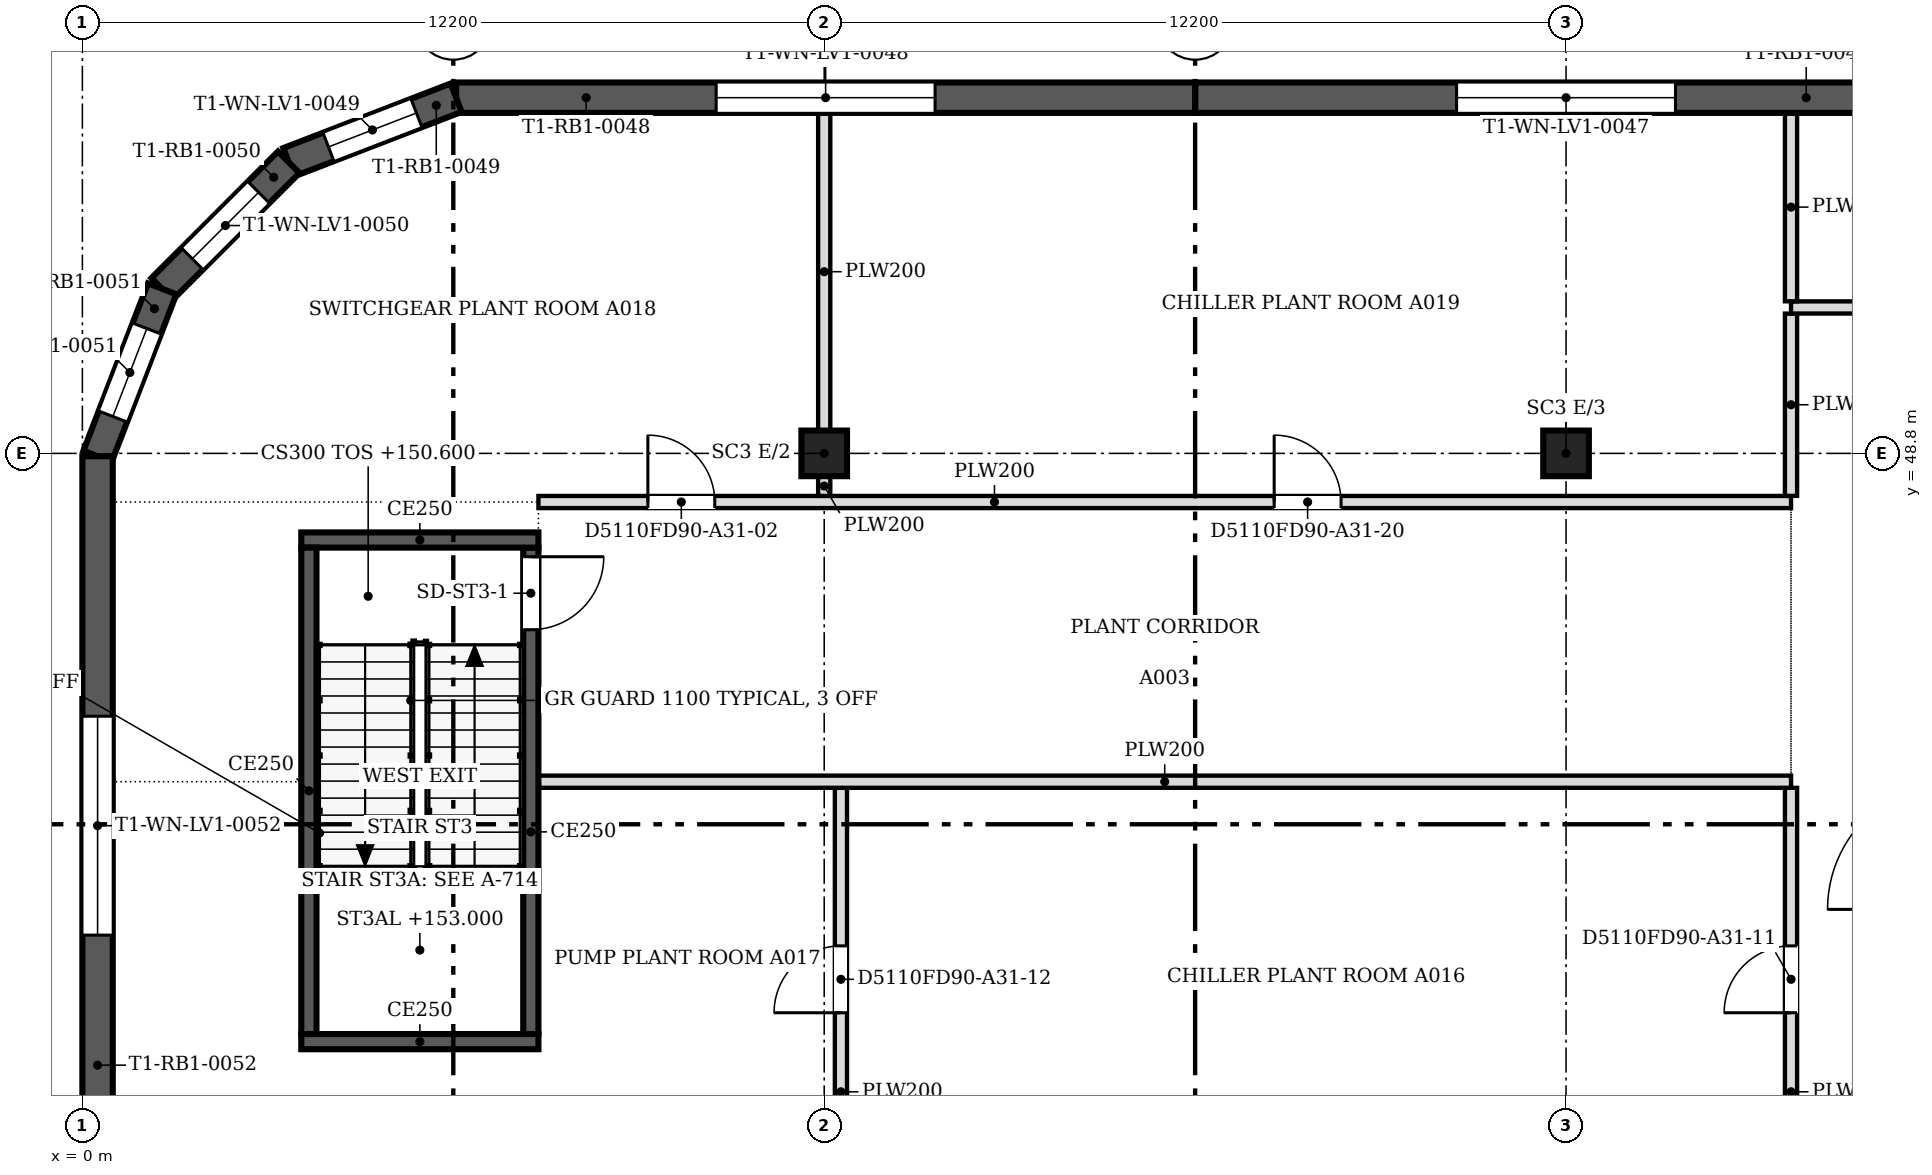
"""IFC4 building model, lengths in metres.
Left out: names, types, materials, properties, quantities, classifications, styles, units other than length and angle.
Written with IfcOpenShell. Run it as: python <this file> out.ifc"""

import sys

from ifc_helpers import new_model, si_unit, direction, frame, frame_2d, origin, origin_2d, place, context, subcontext, project, spatial, polyline, rectangle, outline, extrude, faceted_brep, source, transform, mapped, element, fill, save


model = new_model("IFC4")
c1 = context("Model", 3, precision=1e-05, world=origin(), true_north=direction((0.0, 1.0)))
c2 = subcontext(c1, "Body", "Model", "MODEL_VIEW")
j1 = project(units=[si_unit("LENGTHUNIT", "METRE"), si_unit("PLANEANGLEUNIT", "RADIAN")], contexts=[c1])
p1 = place(None, origin())
s1 = spatial("IfcSite", under=j1, at=p1, CompositionType="ELEMENT")
p2 = place(p1, origin())
s2 = spatial("IfcBuilding", under=s1, at=p2, CompositionType="ELEMENT")
p3 = place(p2, frame((0.0, 0.0, 150.6)))
s3 = spatial("IfcBuildingStorey", under=s2, at=p3, CompositionType="ELEMENT", Elevation=150.6)
for number, where, z_axis, x_axis in (
    (1, (12.2, 48.8, 0.0), (0.0, 0.0, 1.0), (1.0, 0.0, 0.0)),
    (2, (24.4, 48.8, 0.0), (0.0, 0.0, 1.0), (1.0, 0.0, 0.0)),
):
    element("IfcColumn", number, at=place(p3, frame(where, z_axis=z_axis, x_axis=x_axis)), inside=s3, PredefinedType="COLUMN", context=c2, shape_type="SweptSolid", body=[
        extrude(rectangle(XDim=0.75, YDim=0.75, at=origin_2d()), origin(), (0.0, 0.0, 1.0), 4.6),
    ])
m1 = source(origin(), c2, "Body", "SweptSolid", [
    extrude(outline(polyline([(0.0, 0.0), (12.2, 0.0), (12.2, 4.8), (0.0, 4.8), (0.0, 0.0)])), frame((0.0, 0.25, 0.0), z_axis=(0.0, -1.0, 0.0), x_axis=(1.0, 0.0, 0.0)), (0.0, 0.0, 1.0), 0.5),
])
p4 = place(p3, frame((30.5, 54.65, 0.0), z_axis=(0.0, 0.0, 1.0), x_axis=(-1.0, 0.0, 0.0)))
e3 = element("IfcWall", 3, at=p4, inside=s3, PredefinedType="SOLIDWALL", context=c2, shape_type="MappedRepresentation", body=[
    mapped(m1, transform((0.0, 0.0, 0.0), scale=1.0)),
])
m2 = source(origin(), c2, "Body", "SweptSolid", [
    extrude(outline(polyline([(4.3, 0.8), (7.9, 0.8), (7.9, 4.0), (4.3, 4.0), (4.3, 0.8)])), frame((0.0, 0.26, 0.0), z_axis=(0.0, -1.0, 0.0), x_axis=(1.0, 0.0, 0.0)), (0.0, 0.0, 1.0), 0.52),
])
p5 = place(p4, origin())
e4 = element("IfcOpeningElement", 4, at=p5, cuts=e3, PredefinedType="OPENING", context=c2, shape_type="MappedRepresentation", body=[
    mapped(m2, transform((0.0, 0.0, 0.0), scale=1.0)),
])
m3 = source(origin(), c2, "Body", "Brep", [
    faceted_brep([(0.0, -0.25, 0.0), (12.154, -0.25, 0.0), (12.154, -0.25, 4.8), (0.0, -0.25, 4.8), (0.0, 0.25, 4.8), (12.107, 0.25, 4.8), (12.107, 0.25, 0.0), (0.0, 0.25, 0.0), (12.154, -0.0, 0.0), (12.154, -0.0, 4.8)], [[[0, 1, 2, 3]], [[4, 5, 6, 7]], [[7, 6, 8, 1, 0]], [[9, 2, 1, 8]], [[5, 4, 3, 2, 9]], [[4, 7, 0, 3]], [[8, 6, 5, 9]]]),
])
p6 = place(p3, frame((18.3, 54.65, 0.0), z_axis=(0.0, 0.0, 1.0), x_axis=(-1.0, 0.0, 0.0)))
e5 = element("IfcWall", 5, at=p6, inside=s3, PredefinedType="SOLIDWALL", context=c2, shape_type="MappedRepresentation", body=[
    mapped(m3, transform((0.0, 0.0, 0.0), scale=1.0)),
])
m4 = source(origin(), c2, "Body", "SweptSolid", [
    extrude(outline(polyline([(4.277, 0.8), (7.877, 0.8), (7.877, 4.0), (4.277, 4.0), (4.277, 0.8)])), frame((0.0, 0.26, 0.0), z_axis=(0.0, -1.0, 0.0), x_axis=(1.0, 0.0, 0.0)), (0.0, 0.0, 1.0), 0.52),
])
p7 = place(p6, origin())
e6 = element("IfcOpeningElement", 6, at=p7, cuts=e5, PredefinedType="OPENING", context=c2, shape_type="MappedRepresentation", body=[
    mapped(m4, transform((0.0, 0.0, 0.0), scale=1.0)),
])
m5 = source(origin(), c2, "Body", "Brep", [
    faceted_brep([(0.0, -0.25, 0.0), (2.95, -0.25, 0.0), (2.95, -0.25, 4.8), (0.0, -0.25, 4.8), (0.047, 0.25, 4.8), (2.898, 0.25, 4.8), (2.898, 0.25, 0.0), (0.047, 0.25, 0.0), (2.95, 0.0, 0.0), (0.0, 0.0, 0.0), (2.95, 0.0, 4.8), (0.0, 0.0, 4.8)], [[[0, 1, 2, 3]], [[4, 5, 6, 7]], [[7, 6, 8, 1, 0, 9]], [[10, 2, 1, 8]], [[5, 4, 11, 3, 2, 10]], [[9, 0, 3, 11]], [[7, 9, 11, 4]], [[8, 6, 5, 10]]]),
])
p8 = place(p3, frame((6.146, 54.65, 0.0), z_axis=(0.0, 0.0, 1.0), x_axis=(-0.932999673775, -0.359877213415, 0.0)))
e7 = element("IfcWall", 7, at=p8, inside=s3, PredefinedType="SOLIDWALL", context=c2, shape_type="MappedRepresentation", body=[
    mapped(m5, transform((0.0, 0.0, 0.0), scale=1.0)),
])
m6 = source(origin(), c2, "Body", "SweptSolid", [
    extrude(outline(polyline([(0.7, 0.8), (2.25, 0.8), (2.25, 4.0), (0.7, 4.0), (0.7, 0.8)])), frame((0.0, 0.26, 0.0), z_axis=(0.0, -1.0, 0.0), x_axis=(1.0, 0.0, 0.0)), (0.0, 0.0, 1.0), 0.52),
])
p9 = place(p8, origin())
e8 = element("IfcOpeningElement", 8, at=p9, cuts=e7, PredefinedType="OPENING", context=c2, shape_type="MappedRepresentation", body=[
    mapped(m6, transform((0.0, 0.0, 0.0), scale=1.0)),
])
m7 = source(origin(), c2, "Body", "Brep", [
    faceted_brep([(0.0, -0.25, 0.0), (2.944, -0.25, 0.0), (2.944, -0.25, 4.8), (0.0, -0.25, 4.8), (0.053, 0.25, 4.8), (2.891, 0.25, 4.8), (2.891, 0.25, 0.0), (0.053, 0.25, 0.0), (2.944, 0.0, 0.0), (0.0, 0.0, 0.0), (2.944, 0.0, 4.8), (0.0, 0.0, 4.8)], [[[0, 1, 2, 3]], [[4, 5, 6, 7]], [[7, 6, 8, 1, 0, 9]], [[10, 2, 1, 8]], [[5, 4, 11, 3, 2, 10]], [[9, 0, 3, 11]], [[7, 9, 11, 4]], [[8, 6, 5, 10]]]),
])
p10 = place(p3, frame((3.394, 53.588, 0.0), z_axis=(0.0, 0.0, 1.0), x_axis=(-0.707106781187, -0.707106781187, 0.0)))
e9 = element("IfcWall", 9, at=p10, inside=s3, PredefinedType="SOLIDWALL", context=c2, shape_type="MappedRepresentation", body=[
    mapped(m7, transform((0.0, 0.0, 0.0), scale=1.0)),
])
m8 = source(origin(), c2, "Body", "SweptSolid", [
    extrude(outline(polyline([(0.7, 0.8), (2.244, 0.8), (2.244, 4.0), (0.7, 4.0), (0.7, 0.8)])), frame((0.0, 0.26, 0.0), z_axis=(0.0, -1.0, 0.0), x_axis=(1.0, 0.0, 0.0)), (0.0, 0.0, 1.0), 0.52),
])
p11 = place(p10, origin())
e10 = element("IfcOpeningElement", 10, at=p11, cuts=e9, PredefinedType="OPENING", context=c2, shape_type="MappedRepresentation", body=[
    mapped(m8, transform((0.0, 0.0, 0.0), scale=1.0)),
])
m9 = source(origin(), c2, "Body", "Brep", [
    faceted_brep([(0.0, -0.25, 0.0), (2.95, -0.25, 0.0), (2.95, -0.25, 4.8), (0.0, -0.25, 4.8), (0.053, 0.25, 4.8), (2.904, 0.25, 4.8), (2.904, 0.25, 0.0), (0.053, 0.25, 0.0), (2.95, 0.0, 0.0), (0.0, 0.0, 0.0), (2.95, 0.0, 4.8), (0.0, 0.0, 4.8)], [[[0, 1, 2, 3]], [[4, 5, 6, 7]], [[7, 6, 8, 1, 0, 9]], [[10, 2, 1, 8]], [[5, 4, 11, 3, 2, 10]], [[9, 0, 3, 11]], [[7, 9, 11, 4]], [[8, 6, 5, 10]]]),
])
p12 = place(p3, frame((1.312, 51.506, 0.0), z_axis=(0.0, 0.0, 1.0), x_axis=(-0.359921456299, -0.932982607178, 0.0)))
e11 = element("IfcWall", 11, at=p12, inside=s3, PredefinedType="SOLIDWALL", context=c2, shape_type="MappedRepresentation", body=[
    mapped(m9, transform((0.0, 0.0, 0.0), scale=1.0)),
])
p13 = place(p12, origin())
e12 = element("IfcOpeningElement", 12, at=p13, cuts=e11, PredefinedType="OPENING", context=c2, shape_type="MappedRepresentation", body=[
    mapped(m6, transform((0.0, 0.0, 0.0), scale=1.0)),
])
m10 = source(origin(), c2, "Body", "Brep", [
    faceted_brep([(0.0, -0.25, 0.0), (12.154, -0.25, 0.0), (12.154, -0.25, 4.8), (0.0, -0.25, 4.8), (0.047, 0.25, 4.8), (12.154, 0.25, 4.8), (12.154, 0.25, 0.0), (0.047, 0.25, 0.0), (0.0, 0.0, 0.0), (0.0, 0.0, 4.8)], [[[0, 1, 2, 3]], [[4, 5, 6, 7]], [[7, 6, 1, 0, 8]], [[5, 4, 9, 3, 2]], [[8, 0, 3, 9]], [[7, 8, 9, 4]], [[1, 6, 5, 2]]]),
])
p14 = place(p3, frame((0.25, 48.753, 0.0), z_axis=(0.0, 0.0, 1.0), x_axis=(0.0, -1.0, 0.0)))
e13 = element("IfcWall", 13, at=p14, inside=s3, PredefinedType="SOLIDWALL", context=c2, shape_type="MappedRepresentation", body=[
    mapped(m10, transform((0.0, 0.0, 0.0), scale=1.0)),
])
p15 = place(p14, origin())
e14 = element("IfcOpeningElement", 14, at=p15, cuts=e13, PredefinedType="OPENING", context=c2, shape_type="MappedRepresentation", body=[
    mapped(m4, transform((0.0, 0.0, 0.0), scale=1.0)),
])
p16 = place(p3, frame((7.5, 39.125, 0.0), z_axis=(0.0, 0.0, 1.0), x_axis=(-1.0, 0.0, 0.0)))
e15 = element("IfcWall", 15, at=p16, inside=s3, PredefinedType="SOLIDWALL", context=c2, shape_type="SweptSolid", body=[
    extrude(rectangle(XDim=3.9, YDim=0.25, at=frame_2d((1.95, 0.0))), origin(), (0.0, 0.0, 1.0), 4.8),
])
p17 = place(p3, frame((3.725, 39.25, 0.0), z_axis=(0.0, 0.0, 1.0), x_axis=(0.0, 1.0, 0.0)))
e16 = element("IfcWall", 16, at=p17, inside=s3, PredefinedType="SOLIDWALL", context=c2, shape_type="SweptSolid", body=[
    extrude(rectangle(XDim=8.0, YDim=0.25, at=frame_2d((4.0, 0.0))), origin(), (0.0, 0.0, 1.0), 4.8),
])
p18 = place(p3, frame((3.6, 47.375, 0.0), z_axis=(0.0, 0.0, 1.0), x_axis=(1.0, 0.0, 0.0)))
e17 = element("IfcWall", 17, at=p18, inside=s3, PredefinedType="SOLIDWALL", context=c2, shape_type="SweptSolid", body=[
    extrude(rectangle(XDim=3.9, YDim=0.25, at=frame_2d((1.95, 0.0))), origin(), (0.0, 0.0, 1.0), 4.8),
])
p19 = place(p3, frame((7.375, 47.25, 0.0), z_axis=(0.0, 0.0, 1.0), x_axis=(0.0, -1.0, 0.0)))
e18 = element("IfcWall", 18, at=p19, inside=s3, PredefinedType="SOLIDWALL", context=c2, shape_type="SweptSolid", body=[
    extrude(rectangle(XDim=8.0, YDim=0.25, at=frame_2d((4.0, 0.0))), origin(), (0.0, 0.0, 1.0), 4.8),
])
m11 = source(origin(), c2, "Body", "SweptSolid", [
    extrude(rectangle(XDim=1.2, YDim=2.1, at=frame_2d((0.6, 1.05))), frame((0.0, 0.135, 0.0), z_axis=(0.0, -1.0, 0.0), x_axis=(1.0, 0.0, 0.0)), (0.0, 0.0, 1.0), 0.27),
])
p20 = place(p19, frame((0.15, 0.0, 0.0)))
e19 = element("IfcOpeningElement", 19, at=p20, cuts=e18, PredefinedType="OPENING", context=c2, shape_type="MappedRepresentation", body=[
    mapped(m11, transform((0.0, 0.0, 0.0), scale=1.0)),
])
p21 = place(p3, frame((12.475, 37.0, 0.0), z_axis=(0.0, 0.0, 1.0), x_axis=(0.0, 1.0, 0.0)))
e20 = element("IfcWall", 20, at=p21, inside=s3, PredefinedType="PARTITIONING", context=c2, shape_type="SweptSolid", body=[
    extrude(rectangle(XDim=6.299, YDim=0.2, at=frame_2d((3.149, 0.0))), origin(), (0.0, 0.0, 1.0), 4.067),
])
m12 = source(origin(), c2, "Body", "SweptSolid", [
    extrude(rectangle(XDim=1.1, YDim=2.1, at=frame_2d((0.55, 1.05))), frame((0.0, 0.11, 0.0), z_axis=(0.0, -1.0, 0.0), x_axis=(1.0, 0.0, 0.0)), (0.0, 0.0, 1.0), 0.22),
])
p22 = place(p21, frame((2.6, 0.0, 0.0)))
e21 = element("IfcOpeningElement", 21, at=p22, cuts=e20, PredefinedType="OPENING", context=c2, shape_type="MappedRepresentation", body=[
    mapped(m12, transform((0.0, 0.0, 0.0), scale=1.0)),
])
p23 = place(p3, frame((28.1, 37.0, 0.0), z_axis=(0.0, 0.0, 1.0), x_axis=(0.0, 1.0, 0.0)))
e22 = element("IfcWall", 22, at=p23, inside=s3, PredefinedType="PARTITIONING", context=c2, shape_type="SweptSolid", body=[
    extrude(rectangle(XDim=6.299, YDim=0.2, at=frame_2d((3.149, 0.0))), origin(), (0.0, 0.0, 1.0), 4.067),
])
p24 = place(p23, frame((2.6, 0.0, 0.0)))
e23 = element("IfcOpeningElement", 23, at=p24, cuts=e22, PredefinedType="OPENING", context=c2, shape_type="MappedRepresentation", body=[
    mapped(m12, transform((0.0, 0.0, 0.0), scale=1.0)),
])
p25 = place(p3, frame((7.5, 43.4, 0.0), z_axis=(0.0, 0.0, 1.0), x_axis=(1.0, 0.0, 0.0)))
e24 = element("IfcWall", 24, at=p25, inside=s3, PredefinedType="PARTITIONING", context=c2, shape_type="SweptSolid", body=[
    extrude(rectangle(XDim=20.6, YDim=0.2, at=frame_2d((10.3, 0.0))), origin(), (0.0, 0.0, 1.0), 4.067),
])
p26 = place(p3, frame((7.5, 48.0, 0.0), z_axis=(0.0, 0.0, 1.0), x_axis=(1.0, 0.0, 0.0)))
e25 = element("IfcWall", 25, at=p26, inside=s3, PredefinedType="PARTITIONING", context=c2, shape_type="SweptSolid", body=[
    extrude(rectangle(XDim=20.6, YDim=0.2, at=frame_2d((10.3, 0.0))), origin(), (0.0, 0.0, 1.0), 4.067),
])
p27 = place(p26, frame((1.8, 0.0, 0.0)))
e26 = element("IfcOpeningElement", 26, at=p27, cuts=e25, PredefinedType="OPENING", context=c2, shape_type="MappedRepresentation", body=[
    mapped(m12, transform((0.0, 0.0, 0.0), scale=1.0)),
])
p28 = place(p26, frame((12.1, 0.0, 0.0)))
e27 = element("IfcOpeningElement", 27, at=p28, cuts=e25, PredefinedType="OPENING", context=c2, shape_type="MappedRepresentation", body=[
    mapped(m12, transform((0.0, 0.0, 0.0), scale=1.0)),
])
p29 = place(p3, frame((12.2, 48.101, 0.0), z_axis=(0.0, 0.0, 1.0), x_axis=(0.0, 1.0, 0.0)))
e28 = element("IfcWall", 28, at=p29, inside=s3, PredefinedType="PARTITIONING", context=c2, shape_type="SweptSolid", body=[
    extrude(rectangle(XDim=0.323, YDim=0.2, at=frame_2d((0.162, 0.0))), origin(), (0.0, 0.0, 1.0), 4.067),
])
p30 = place(p3, frame((28.1, 48.101, 0.0), z_axis=(0.0, 0.0, 1.0), x_axis=(0.0, 1.0, 0.0)))
e29 = element("IfcWall", 29, at=p30, inside=s3, PredefinedType="PARTITIONING", context=c2, shape_type="SweptSolid", body=[
    extrude(rectangle(XDim=2.998, YDim=0.2, at=frame_2d((1.499, 0.0))), origin(), (0.0, 0.0, 1.0), 4.067),
])
p31 = place(p3, frame((12.2, 49.176, 0.0), z_axis=(0.0, 0.0, 1.0), x_axis=(0.0, 1.0, 0.0)))
e30 = element("IfcWall", 30, at=p31, inside=s3, PredefinedType="PARTITIONING", context=c2, shape_type="SweptSolid", body=[
    extrude(rectangle(XDim=5.224, YDim=0.2, at=frame_2d((2.612, 0.0))), origin(), (0.0, 0.0, 1.0), 4.067),
])
p32 = place(p3, frame((28.1, 51.2, 0.0), z_axis=(0.0, 0.0, 1.0), x_axis=(1.0, 0.0, 0.0)))
e31 = element("IfcWall", 31, at=p32, inside=s3, PredefinedType="PARTITIONING", context=c2, shape_type="SweptSolid", body=[
    extrude(rectangle(XDim=31.413, YDim=0.2, at=frame_2d((15.707, 0.0))), origin(), (0.0, 0.0, 1.0), 4.067),
])
p33 = place(p32, frame((17.401, 0.0, 0.0)))
e32 = element("IfcOpeningElement", 32, at=p33, cuts=e31, PredefinedType="OPENING", context=c2, shape_type="MappedRepresentation", body=[
    mapped(m12, transform((0.0, 0.0, 0.0), scale=1.0)),
])
p34 = place(p32, frame((11.401, 0.0, 0.0)))
e33 = element("IfcOpeningElement", 33, at=p34, cuts=e31, PredefinedType="OPENING", context=c2, shape_type="MappedRepresentation", body=[
    mapped(m12, transform((0.0, 0.0, 0.0), scale=1.0)),
])
p35 = place(p32, frame((3.9, 0.0, 0.0)))
e34 = element("IfcOpeningElement", 34, at=p35, cuts=e31, PredefinedType="OPENING", context=c2, shape_type="MappedRepresentation", body=[
    mapped(m12, transform((0.0, 0.0, 0.0), scale=1.0)),
])
p36 = place(p32, frame((25.7, 0.0, 0.0)))
e35 = element("IfcOpeningElement", 35, at=p36, cuts=e31, PredefinedType="OPENING", context=c2, shape_type="MappedRepresentation", body=[
    mapped(m12, transform((0.0, 0.0, 0.0), scale=1.0)),
])
p37 = place(p3, frame((28.1, 51.301, 0.0), z_axis=(0.0, 0.0, 1.0), x_axis=(0.0, 1.0, 0.0)))
e36 = element("IfcWall", 36, at=p37, inside=s3, PredefinedType="PARTITIONING", context=c2, shape_type="SweptSolid", body=[
    extrude(rectangle(XDim=3.099, YDim=0.2, at=frame_2d((1.549, 0.0))), origin(), (0.0, 0.0, 1.0), 4.067),
])
m13 = source(origin(), c2, "Body", "SweptSolid", [
    extrude(outline(polyline([(4.3, 0.8), (7.9, 0.8), (7.9, 4.0), (4.3, 4.0), (4.3, 0.8)])), frame((0.0, 0.03, 0.0), z_axis=(0.0, -1.0, 0.0), x_axis=(1.0, 0.0, 0.0)), (0.0, 0.0, 1.0), 0.06),
])
p38 = place(p5, origin())
e37 = element("IfcWindow", 37, at=p38, inside=s3, PartitioningType="USERDEFINED", PredefinedType="WINDOW", context=c2, shape_type="MappedRepresentation", body=[
    mapped(m13, transform((0.0, 0.0, 0.0), scale=1.0)),
])
fill(e4, e37)
m14 = source(origin(), c2, "Body", "SweptSolid", [
    extrude(outline(polyline([(4.277, 0.8), (7.877, 0.8), (7.877, 4.0), (4.277, 4.0), (4.277, 0.8)])), frame((0.0, 0.03, 0.0), z_axis=(0.0, -1.0, 0.0), x_axis=(1.0, 0.0, 0.0)), (0.0, 0.0, 1.0), 0.06),
])
p39 = place(p7, origin())
e38 = element("IfcWindow", 38, at=p39, inside=s3, PartitioningType="USERDEFINED", PredefinedType="WINDOW", context=c2, shape_type="MappedRepresentation", body=[
    mapped(m14, transform((0.0, 0.0, 0.0), scale=1.0)),
])
fill(e6, e38)
m15 = source(origin(), c2, "Body", "SweptSolid", [
    extrude(outline(polyline([(0.7, 0.8), (2.25, 0.8), (2.25, 4.0), (0.7, 4.0), (0.7, 0.8)])), frame((0.0, 0.03, 0.0), z_axis=(0.0, -1.0, 0.0), x_axis=(1.0, 0.0, 0.0)), (0.0, 0.0, 1.0), 0.06),
])
p40 = place(p9, origin())
e39 = element("IfcWindow", 39, at=p40, inside=s3, PartitioningType="USERDEFINED", PredefinedType="WINDOW", context=c2, shape_type="MappedRepresentation", body=[
    mapped(m15, transform((0.0, 0.0, 0.0), scale=1.0)),
])
fill(e8, e39)
m16 = source(origin(), c2, "Body", "SweptSolid", [
    extrude(outline(polyline([(0.7, 0.8), (2.244, 0.8), (2.244, 4.0), (0.7, 4.0), (0.7, 0.8)])), frame((0.0, 0.03, 0.0), z_axis=(0.0, -1.0, 0.0), x_axis=(1.0, 0.0, 0.0)), (0.0, 0.0, 1.0), 0.06),
])
p41 = place(p11, origin())
e40 = element("IfcWindow", 40, at=p41, inside=s3, PartitioningType="USERDEFINED", PredefinedType="WINDOW", context=c2, shape_type="MappedRepresentation", body=[
    mapped(m16, transform((0.0, 0.0, 0.0), scale=1.0)),
])
fill(e10, e40)
p42 = place(p13, origin())
e41 = element("IfcWindow", 41, at=p42, inside=s3, PartitioningType="USERDEFINED", PredefinedType="WINDOW", context=c2, shape_type="MappedRepresentation", body=[
    mapped(m15, transform((0.0, 0.0, 0.0), scale=1.0)),
])
fill(e12, e41)
p43 = place(p15, origin())
e42 = element("IfcWindow", 42, at=p43, inside=s3, PartitioningType="USERDEFINED", PredefinedType="WINDOW", context=c2, shape_type="MappedRepresentation", body=[
    mapped(m14, transform((0.0, 0.0, 0.0), scale=1.0)),
])
fill(e14, e42)
m17 = source(origin(), c2, "Body", "SweptSolid", [
    extrude(rectangle(XDim=1.2, YDim=2.1, at=frame_2d((0.6, 1.05))), frame((0.0, 0.025, 0.0), z_axis=(0.0, -1.0, 0.0), x_axis=(1.0, 0.0, 0.0)), (0.0, 0.0, 1.0), 0.05),
])
p44 = place(p20, origin())
e43 = element("IfcDoor", 43, at=p44, inside=s3, OperationType="SINGLE_SWING_LEFT", PredefinedType="DOOR", context=c2, shape_type="MappedRepresentation", body=[
    mapped(m17, transform((0.0, 0.0, 0.0), scale=1.0)),
])
fill(e19, e43)
m18 = source(origin(), c2, "Body", "SweptSolid", [
    extrude(rectangle(XDim=1.1, YDim=2.1, at=frame_2d((0.55, 1.05))), frame((0.0, 0.025, 0.0), z_axis=(0.0, -1.0, 0.0), x_axis=(1.0, 0.0, 0.0)), (0.0, 0.0, 1.0), 0.05),
])
p45 = place(p27, origin())
e44 = element("IfcDoor", 44, at=p45, inside=s3, OperationType="SINGLE_SWING_LEFT", PredefinedType="DOOR", context=c2, shape_type="MappedRepresentation", body=[
    mapped(m18, transform((0.0, 0.0, 0.0), scale=1.0)),
])
fill(e26, e44)
p46 = place(p24, origin())
e45 = element("IfcDoor", 45, at=p46, inside=s3, OperationType="SINGLE_SWING_LEFT", PredefinedType="DOOR", context=c2, shape_type="MappedRepresentation", body=[
    mapped(m18, transform((0.0, 0.0, 0.0), scale=1.0)),
])
fill(e23, e45)
p47 = place(p22, origin())
e46 = element("IfcDoor", 46, at=p47, inside=s3, OperationType="SINGLE_SWING_LEFT", PredefinedType="DOOR", context=c2, shape_type="MappedRepresentation", body=[
    mapped(m18, transform((0.0, 0.0, 0.0), scale=1.0)),
])
fill(e21, e46)
p48 = place(p28, origin())
e47 = element("IfcDoor", 47, at=p48, inside=s3, OperationType="SINGLE_SWING_LEFT", PredefinedType="DOOR", context=c2, shape_type="MappedRepresentation", body=[
    mapped(m18, transform((0.0, 0.0, 0.0), scale=1.0)),
])
fill(e27, e47)
save(model, sys.argv[1])
